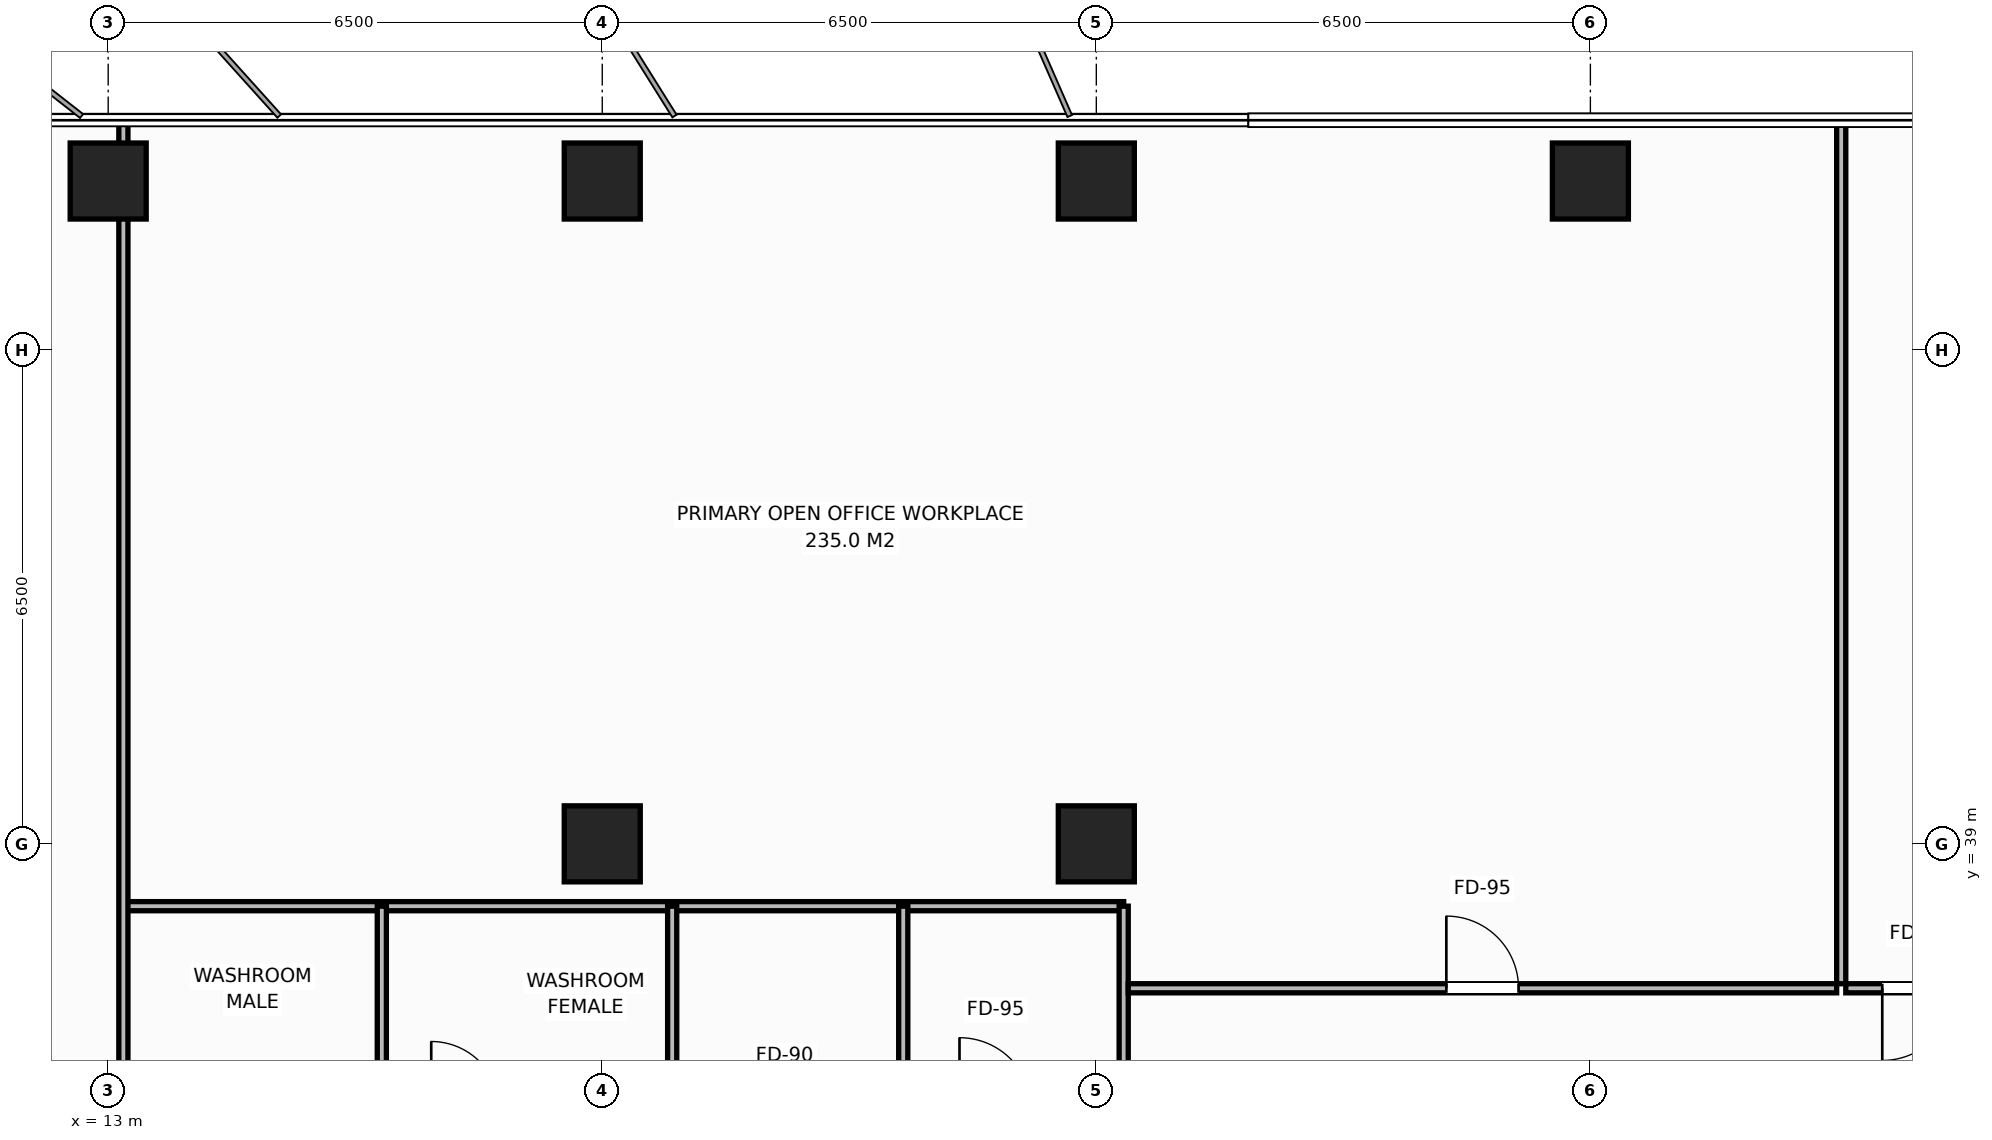
"""IFC4 building model, lengths in metres.
Left out: names, types, materials, properties, quantities, classifications, styles, units other than length and angle.
Written with IfcOpenShell. Run it as: python <this file> out.ifc"""

import sys

from ifc_helpers import new_model, si_unit, direction, frame, frame_2d, origin, origin_2d, place, context, subcontext, project, spatial, rectangle, extrude, element, fill, save


model = new_model("IFC4")
c1 = context("Model", 3, precision=1e-05, world=origin(), true_north=direction((0.0, 1.0)))
c2 = subcontext(c1, "Body", "Model", "MODEL_VIEW")
j1 = project(units=[si_unit("LENGTHUNIT", "METRE"), si_unit("PLANEANGLEUNIT", "RADIAN")], contexts=[c1])
p1 = place(None, origin())
s1 = spatial("IfcSite", under=j1, at=p1, CompositionType="ELEMENT")
p2 = place(p1, origin())
s2 = spatial("IfcBuilding", under=s1, at=p2, CompositionType="ELEMENT")
p3 = place(p2, frame((0.0, 0.0, 186.0)))
s3 = spatial("IfcBuildingStorey", under=s2, at=p3, CompositionType="ELEMENT", Elevation=186.0)
for number, where, z_axis, x_axis in (
    (1, (19.5, 39.0, 0.0), (0.0, 0.0, 1.0), (1.0, 0.0, 0.0)),
    (2, (26.0, 39.0, 0.0), (0.0, 0.0, 1.0), (1.0, 0.0, 0.0)),
    (3, (13.0, 47.72, 0.0), (0.0, 0.0, 1.0), (1.0, 0.0, 0.0)),
    (4, (19.5, 47.72, 0.0), (0.0, 0.0, 1.0), (1.0, 0.0, 0.0)),
    (5, (26.0, 47.72, 0.0), (0.0, 0.0, 1.0), (1.0, 0.0, 0.0)),
    (6, (32.5, 47.72, 0.0), (0.0, 0.0, 1.0), (1.0, 0.0, 0.0)),
):
    element("IfcColumn", number, at=place(p3, frame(where, z_axis=z_axis, x_axis=x_axis)), inside=s3, PredefinedType="COLUMN", context=c2, shape_type="SweptSolid", body=[
        extrude(rectangle(XDim=1.0, YDim=1.0, at=origin_2d()), origin(), (0.0, 0.0, 1.0), 3.8),
    ])
p4 = place(p3, frame((13.2, 38.18, 0.0), z_axis=(0.0, 0.0, 1.0), x_axis=(1.0, 0.0, 0.0)))
e7 = element("IfcWall", 7, at=p4, inside=s3, PredefinedType="PARTITIONING", context=c2, shape_type="SweptSolid", body=[
    extrude(rectangle(XDim=13.16, YDim=0.12, at=frame_2d((6.58, 0.0))), origin(), (0.0, 0.0, 1.0), 3.572),
])
for number, where, z_axis, x_axis in (
    (8, (16.6, 35.5, 0.0), (0.0, 0.0, 1.0), (0.0, 1.0, 0.0)),
    (9, (20.42, 35.5, 0.0), (0.0, 0.0, 1.0), (0.0, 1.0, 0.0)),
    (10, (23.46, 35.5, 0.0), (0.0, 0.0, 1.0), (0.0, 1.0, 0.0)),
    (11, (26.36, 35.5, 0.0), (0.0, 0.0, 1.0), (0.0, 1.0, 0.0)),
):
    element("IfcWall", number, at=place(p3, frame(where, z_axis=z_axis, x_axis=x_axis)), inside=s3, PredefinedType="PARTITIONING", context=c2, shape_type="SweptSolid", body=[
        extrude(rectangle(XDim=2.68, YDim=0.12, at=frame_2d((1.34, 0.0))), origin(), (0.0, 0.0, 1.0), 3.572),
    ])
p5 = place(p3, frame((13.2, 35.56, 0.0), z_axis=(0.0, 0.0, 1.0), x_axis=(0.0, 1.0, 0.0)))
e12 = element("IfcWall", 12, at=p5, inside=s3, PredefinedType="PARTITIONING", context=c2, shape_type="SweptSolid", body=[
    extrude(rectangle(XDim=13.02, YDim=0.12, at=frame_2d((6.51, 0.0))), origin(), (0.0, 0.0, 1.0), 3.022),
])
p6 = place(p3, frame((35.8, 37.16, 0.0), z_axis=(0.0, 0.0, 1.0), x_axis=(0.0, 1.0, 0.0)))
e13 = element("IfcWall", 13, at=p6, inside=s3, PredefinedType="PARTITIONING", context=c2, shape_type="SweptSolid", body=[
    extrude(rectangle(XDim=11.42, YDim=0.12, at=frame_2d((5.71, 0.0))), origin(), (0.0, 0.0, 1.0), 3.572),
])
p7 = place(p3, frame((26.42, 37.1, 0.0), z_axis=(0.0, 0.0, 1.0), x_axis=(1.0, 0.0, 0.0)))
e14 = element("IfcWall", 14, at=p7, inside=s3, PredefinedType="PARTITIONING", context=c2, shape_type="SweptSolid", body=[
    extrude(rectangle(XDim=9.32, YDim=0.12, at=frame_2d((4.66, 0.0))), origin(), (0.0, 0.0, 1.0), 3.572),
])
p8 = place(p7, frame((4.185, 0.0, 0.0)))
e15 = element("IfcOpeningElement", 15, at=p8, cuts=e14, PredefinedType="OPENING", context=c2, shape_type="SweptSolid", body=[
    extrude(rectangle(XDim=0.95, YDim=2.15, at=frame_2d((0.475, 1.075))), frame((0.0, 0.07, 0.0), z_axis=(0.0, -1.0, 0.0), x_axis=(1.0, 0.0, 0.0)), (0.0, 0.0, 1.0), 0.14),
])
p9 = place(p3, frame((35.86, 37.1, 0.0), z_axis=(0.0, 0.0, 1.0), x_axis=(1.0, 0.0, 0.0)))
e16 = element("IfcWall", 16, at=p9, inside=s3, PredefinedType="PARTITIONING", context=c2, shape_type="SweptSolid", body=[
    extrude(rectangle(XDim=4.886, YDim=0.12, at=frame_2d((2.443, 0.0))), origin(), (0.0, 0.0, 1.0), 3.572),
])
p10 = place(p9, frame((0.48, 0.0, 0.0)))
e17 = element("IfcOpeningElement", 17, at=p10, cuts=e16, PredefinedType="OPENING", context=c2, shape_type="SweptSolid", body=[
    extrude(rectangle(XDim=0.95, YDim=2.15, at=frame_2d((0.475, 1.075))), frame((0.0, 0.07, 0.0), z_axis=(0.0, -1.0, 0.0), x_axis=(1.0, 0.0, 0.0)), (0.0, 0.0, 1.0), 0.14),
])
p11 = place(p8, origin())
e18 = element("IfcDoor", 18, at=p11, inside=s3, OperationType="SINGLE_SWING_LEFT", PredefinedType="DOOR", context=c2, shape_type="SweptSolid", body=[
    extrude(rectangle(XDim=0.95, YDim=2.15, at=frame_2d((0.475, 1.075))), frame((0.0, 0.025, 0.0), z_axis=(0.0, -1.0, 0.0), x_axis=(1.0, 0.0, 0.0)), (0.0, 0.0, 1.0), 0.05),
])
fill(e15, e18)
p12 = place(p10, origin())
e19 = element("IfcDoor", 19, at=p12, inside=s3, OperationType="SINGLE_SWING_RIGHT", PredefinedType="DOOR", context=c2, shape_type="SweptSolid", body=[
    extrude(rectangle(XDim=0.95, YDim=2.15, at=frame_2d((0.475, 1.075))), frame((0.0, 0.025, 0.0), z_axis=(0.0, -1.0, 0.0), x_axis=(1.0, 0.0, 0.0)), (0.0, 0.0, 1.0), 0.05),
])
fill(e17, e19)
save(model, sys.argv[1])
